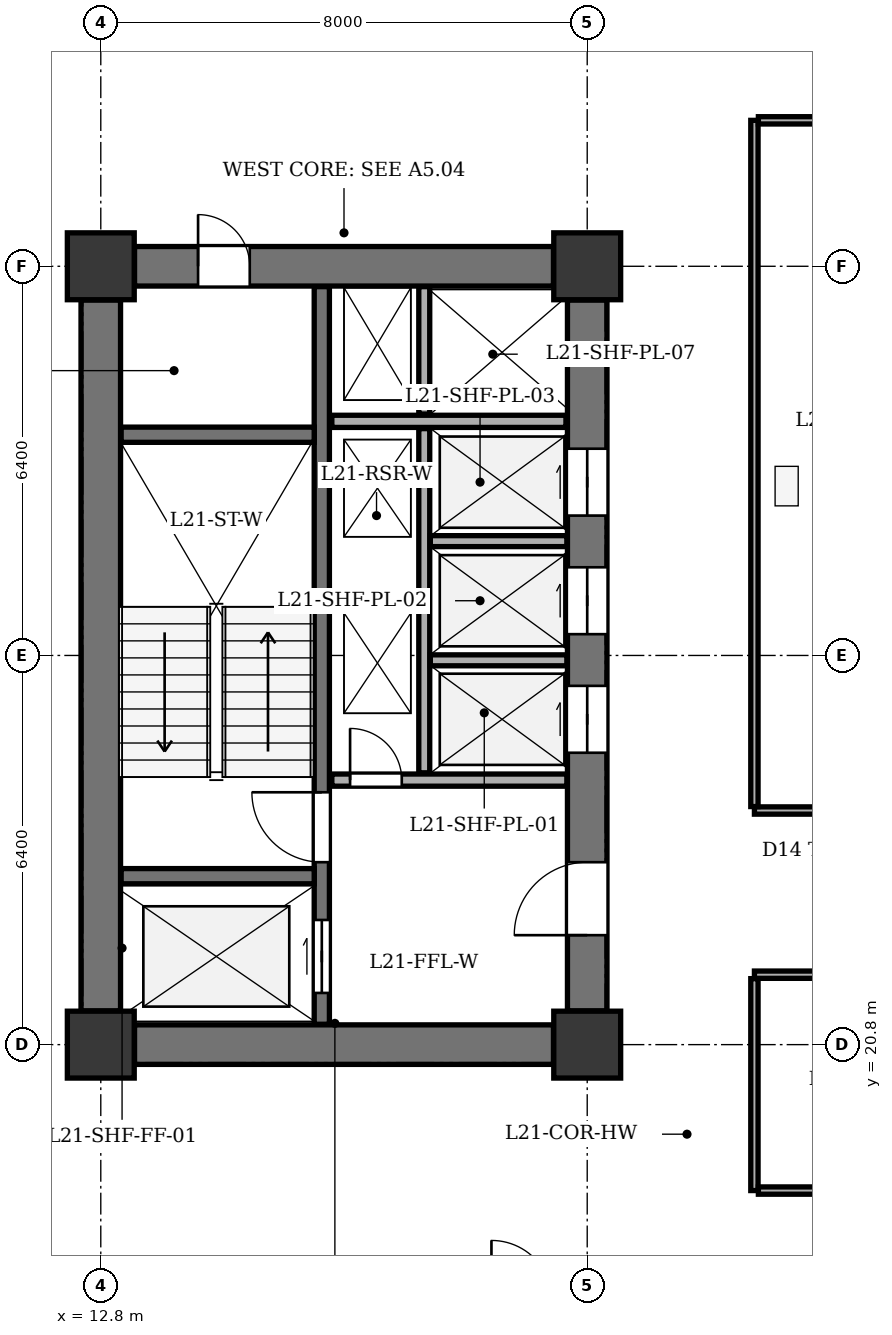
"""IFC4 building model, lengths in metres.
Left out: names, types, materials, properties, quantities, classifications, styles, units other than length and angle.
Written with IfcOpenShell. Run it as: python <this file> out.ifc"""

import sys

from ifc_helpers import new_model, si_unit, direction, frame, frame_2d, origin, origin_2d, place, context, subcontext, project, spatial, rectangle, extrude, element, fill, save


model = new_model("IFC4")
c1 = context("Model", 3, precision=1e-05, world=origin(), true_north=direction((0.0, 1.0)))
c2 = subcontext(c1, "Body", "Model", "MODEL_VIEW")
j1 = project(units=[si_unit("LENGTHUNIT", "METRE"), si_unit("PLANEANGLEUNIT", "RADIAN")], contexts=[c1])
p1 = place(None, origin())
s1 = spatial("IfcSite", under=j1, at=p1, CompositionType="ELEMENT")
p2 = place(p1, origin())
s2 = spatial("IfcBuilding", under=s1, at=p2, CompositionType="ELEMENT")
p3 = place(p2, frame((0.0, 0.0, 86.7)))
s3 = spatial("IfcBuildingStorey", under=s2, at=p3, CompositionType="ELEMENT", Elevation=86.7)
for number, where, z_axis, x_axis in (
    (1, (12.8, 20.8, 0.0), (0.0, 0.0, 1.0), (1.0, 0.0, 0.0)),
    (2, (20.8, 20.8, 0.0), (0.0, 0.0, 1.0), (1.0, 0.0, 0.0)),
    (3, (12.8, 33.6, 0.0), (0.0, 0.0, 1.0), (1.0, 0.0, 0.0)),
    (4, (20.8, 33.6, 0.0), (0.0, 0.0, 1.0), (1.0, 0.0, 0.0)),
):
    element("IfcColumn", number, at=place(p3, frame(where, z_axis=z_axis, x_axis=x_axis)), inside=s3, PredefinedType="COLUMN", context=c2, shape_type="SweptSolid", body=[
        extrude(rectangle(XDim=1.1, YDim=1.1, at=origin_2d()), origin(), (0.0, 0.0, 1.0), 3.9),
    ])
p4 = place(p3, frame((12.8, 21.355, 0.0), z_axis=(0.0, 0.0, 1.0), x_axis=(0.0, 1.0, 0.0)))
e5 = element("IfcWall", 5, at=p4, inside=s3, PredefinedType="SHEAR", context=c2, shape_type="SweptSolid", body=[
    extrude(rectangle(XDim=11.69, YDim=0.65, at=frame_2d((5.845, 0.0))), origin(), (0.0, 0.0, 1.0), 3.6),
])
p5 = place(p3, frame((13.355, 20.8, 0.0), z_axis=(0.0, 0.0, 1.0), x_axis=(1.0, 0.0, 0.0)))
e6 = element("IfcWall", 6, at=p5, inside=s3, PredefinedType="SHEAR", context=c2, shape_type="SweptSolid", body=[
    extrude(rectangle(XDim=6.89, YDim=0.65, at=frame_2d((3.445, 0.0))), origin(), (0.0, 0.0, 1.0), 3.6),
])
p6 = place(p3, frame((13.355, 33.6, 0.0), z_axis=(0.0, 0.0, 1.0), x_axis=(1.0, 0.0, 0.0)))
e7 = element("IfcWall", 7, at=p6, inside=s3, PredefinedType="SHEAR", context=c2, shape_type="SweptSolid", body=[
    extrude(rectangle(XDim=6.89, YDim=0.65, at=frame_2d((3.445, 0.0))), origin(), (0.0, 0.0, 1.0), 3.6),
])
p7 = place(p6, frame((1.045, 0.0, 0.0)))
e8 = element("IfcOpeningElement", 8, at=p7, cuts=e7, PredefinedType="OPENING", context=c2, shape_type="SweptSolid", body=[
    extrude(rectangle(XDim=0.85, YDim=2.02, at=frame_2d((0.425, 1.01))), frame((0.0, 0.335, 0.0), z_axis=(0.0, -1.0, 0.0), x_axis=(1.0, 0.0, 0.0)), (0.0, 0.0, 1.0), 0.67),
])
p8 = place(p3, frame((20.8, 21.355, 0.0), z_axis=(0.0, 0.0, 1.0), x_axis=(0.0, 1.0, 0.0)))
e9 = element("IfcWall", 9, at=p8, inside=s3, PredefinedType="SHEAR", context=c2, shape_type="SweptSolid", body=[
    extrude(rectangle(XDim=11.69, YDim=0.65, at=frame_2d((5.845, 0.0))), origin(), (0.0, 0.0, 1.0), 3.6),
])
p9 = place(p8, frame((1.245, 0.0, 0.0)))
e10 = element("IfcOpeningElement", 10, at=p9, cuts=e9, PredefinedType="OPENING", context=c2, shape_type="SweptSolid", body=[
    extrude(rectangle(XDim=1.2, YDim=2.15, at=frame_2d((0.6, 1.075))), frame((0.0, 0.335, 0.0), z_axis=(0.0, -1.0, 0.0), x_axis=(1.0, 0.0, 0.0)), (0.0, 0.0, 1.0), 0.67),
])
p10 = place(p8, frame((4.245, 0.0, 0.0)))
e11 = element("IfcOpeningElement", 11, at=p10, cuts=e9, PredefinedType="OPENING", context=c2, shape_type="SweptSolid", body=[
    extrude(rectangle(XDim=1.1, YDim=2.1, at=frame_2d((0.55, 1.05))), frame((0.0, 0.335, 0.0), z_axis=(0.0, -1.0, 0.0), x_axis=(1.0, 0.0, 0.0)), (0.0, 0.0, 1.0), 0.67),
])
p11 = place(p8, frame((6.195, 0.0, 0.0)))
e12 = element("IfcOpeningElement", 12, at=p11, cuts=e9, PredefinedType="OPENING", context=c2, shape_type="SweptSolid", body=[
    extrude(rectangle(XDim=1.1, YDim=2.1, at=frame_2d((0.55, 1.05))), frame((0.0, 0.335, 0.0), z_axis=(0.0, -1.0, 0.0), x_axis=(1.0, 0.0, 0.0)), (0.0, 0.0, 1.0), 0.67),
])
p12 = place(p8, frame((8.145, 0.0, 0.0)))
e13 = element("IfcOpeningElement", 13, at=p12, cuts=e9, PredefinedType="OPENING", context=c2, shape_type="SweptSolid", body=[
    extrude(rectangle(XDim=1.1, YDim=2.1, at=frame_2d((0.55, 1.05))), frame((0.0, 0.335, 0.0), z_axis=(0.0, -1.0, 0.0), x_axis=(1.0, 0.0, 0.0)), (0.0, 0.0, 1.0), 0.67),
])
p13 = place(p3, frame((16.435, 21.135, 0.0), z_axis=(0.0, 0.0, 1.0), x_axis=(0.0, 1.0, 0.0)))
e14 = element("IfcWall", 14, at=p13, inside=s3, PredefinedType="SHEAR", context=c2, shape_type="SweptSolid", body=[
    extrude(rectangle(XDim=12.13, YDim=0.25, at=frame_2d((6.065, 0.0))), origin(), (0.0, 0.0, 1.0), 3.6),
])
p14 = place(p13, frame((0.515, 0.0, 0.0)))
e15 = element("IfcOpeningElement", 15, at=p14, cuts=e14, PredefinedType="OPENING", context=c2, shape_type="SweptSolid", body=[
    extrude(rectangle(XDim=1.2, YDim=2.15, at=frame_2d((0.6, 1.075))), frame((0.0, 0.135, 0.0), z_axis=(0.0, -1.0, 0.0), x_axis=(1.0, 0.0, 0.0)), (0.0, 0.0, 1.0), 0.27),
])
p15 = place(p13, frame((2.665, 0.0, 0.0)))
e16 = element("IfcOpeningElement", 16, at=p15, cuts=e14, PredefinedType="OPENING", context=c2, shape_type="SweptSolid", body=[
    extrude(rectangle(XDim=1.15, YDim=2.15, at=frame_2d((0.575, 1.075))), frame((0.0, 0.135, 0.0), z_axis=(0.0, -1.0, 0.0), x_axis=(1.0, 0.0, 0.0)), (0.0, 0.0, 1.0), 0.27),
])
for number, where, z_axis, x_axis in (
    (17, (13.135, 23.57, 0.0), (0.0, 0.0, 1.0), (1.0, 0.0, 0.0)),
    (18, (13.135, 30.83, 0.0), (0.0, 0.0, 1.0), (1.0, 0.0, 0.0)),
):
    element("IfcWall", number, at=place(p3, frame(where, z_axis=z_axis, x_axis=x_axis)), inside=s3, PredefinedType="SHEAR", context=c2, shape_type="SweptSolid", body=[
        extrude(rectangle(XDim=3.175, YDim=0.25, at=frame_2d((1.587, 0.0))), origin(), (0.0, 0.0, 1.0), 3.6),
    ])
p16 = place(p3, frame((16.6, 25.15, 0.0), z_axis=(0.0, 0.0, 1.0), x_axis=(1.0, 0.0, 0.0)))
e19 = element("IfcWall", 19, at=p16, inside=s3, PredefinedType="SOLIDWALL", context=c2, shape_type="SweptSolid", body=[
    extrude(rectangle(XDim=3.865, YDim=0.2, at=frame_2d((1.933, 0.0))), origin(), (0.0, 0.0, 1.0), 3.6),
])
p17 = place(p16, frame((0.3, 0.0, 0.0)))
e20 = element("IfcOpeningElement", 20, at=p17, cuts=e19, PredefinedType="OPENING", context=c2, shape_type="SweptSolid", body=[
    extrude(rectangle(XDim=0.85, YDim=2.02, at=frame_2d((0.425, 1.01))), frame((0.0, 0.11, 0.0), z_axis=(0.0, -1.0, 0.0), x_axis=(1.0, 0.0, 0.0)), (0.0, 0.0, 1.0), 0.22),
])
p18 = place(p3, frame((16.6, 31.05, 0.0), z_axis=(0.0, 0.0, 1.0), x_axis=(1.0, 0.0, 0.0)))
e21 = element("IfcWall", 21, at=p18, inside=s3, PredefinedType="SOLIDWALL", context=c2, shape_type="SweptSolid", body=[
    extrude(rectangle(XDim=3.85, YDim=0.2, at=frame_2d((1.925, 0.0))), origin(), (0.0, 0.0, 1.0), 3.6),
])
p19 = place(p3, frame((18.12, 25.27, 0.0), z_axis=(0.0, 0.0, 1.0), x_axis=(0.0, 1.0, 0.0)))
e22 = element("IfcWall", 22, at=p19, inside=s3, PredefinedType="PARTITIONING", context=c2, shape_type="SweptSolid", body=[
    extrude(rectangle(XDim=5.66, YDim=0.18, at=frame_2d((2.83, 0.0))), origin(), (0.0, 0.0, 1.0), 3.6),
])
p20 = place(p3, frame((18.12, 31.17, 0.0), z_axis=(0.0, 0.0, 1.0), x_axis=(0.0, 1.0, 0.0)))
e23 = element("IfcWall", 23, at=p20, inside=s3, PredefinedType="PARTITIONING", context=c2, shape_type="SweptSolid", body=[
    extrude(rectangle(XDim=2.095, YDim=0.18, at=frame_2d((1.047, 0.0))), origin(), (0.0, 0.0, 1.0), 3.6),
])
for number, where, z_axis, x_axis in (
    (24, (18.22, 27.12, 0.0), (0.0, 0.0, 1.0), (1.0, 0.0, 0.0)),
    (25, (18.22, 29.08, 0.0), (0.0, 0.0, 1.0), (1.0, 0.0, 0.0)),
):
    element("IfcWall", number, at=place(p3, frame(where, z_axis=z_axis, x_axis=x_axis)), inside=s3, PredefinedType="PARTITIONING", context=c2, shape_type="SweptSolid", body=[
        extrude(rectangle(XDim=2.245, YDim=0.18, at=frame_2d((1.123, 0.0))), origin(), (0.0, 0.0, 1.0), 3.6),
    ])
p21 = place(p3, frame((23.55, 24.65, 0.0), z_axis=(0.0, 0.0, 1.0), x_axis=(1.0, 0.0, 0.0)))
e26 = element("IfcWall", 26, at=p21, inside=s3, PredefinedType="PARTITIONING", context=c2, shape_type="SweptSolid", body=[
    extrude(rectangle(XDim=8.9, YDim=0.12, at=frame_2d((4.45, 0.0))), origin(), (0.0, 0.0, 1.0), 3.135),
])
p22 = place(p21, frame((1.0, 0.0, 0.0)))
e27 = element("IfcOpeningElement", 27, at=p22, cuts=e26, PredefinedType="OPENING", context=c2, shape_type="SweptSolid", body=[
    extrude(rectangle(XDim=0.95, YDim=2.1, at=frame_2d((0.475, 1.05))), frame((0.0, 0.07, 0.0), z_axis=(0.0, -1.0, 0.0), x_axis=(1.0, 0.0, 0.0)), (0.0, 0.0, 1.0), 0.14),
])
p23 = place(p21, frame((4.1, 0.0, 0.0)))
e28 = element("IfcOpeningElement", 28, at=p23, cuts=e26, PredefinedType="OPENING", context=c2, shape_type="SweptSolid", body=[
    extrude(rectangle(XDim=0.95, YDim=2.1, at=frame_2d((0.475, 1.05))), frame((0.0, 0.07, 0.0), z_axis=(0.0, -1.0, 0.0), x_axis=(1.0, 0.0, 0.0)), (0.0, 0.0, 1.0), 0.14),
])
p24 = place(p21, frame((7.0, 0.0, 0.0)))
e29 = element("IfcOpeningElement", 29, at=p24, cuts=e26, PredefinedType="OPENING", context=c2, shape_type="SweptSolid", body=[
    extrude(rectangle(XDim=1.0, YDim=2.1, at=frame_2d((0.5, 1.05))), frame((0.0, 0.07, 0.0), z_axis=(0.0, -1.0, 0.0), x_axis=(1.0, 0.0, 0.0)), (0.0, 0.0, 1.0), 0.14),
])
p25 = place(p3, frame((23.55, 24.715, 0.0), z_axis=(0.0, 0.0, 1.0), x_axis=(0.0, 1.0, 0.0)))
e30 = element("IfcWall", 30, at=p25, inside=s3, PredefinedType="PARTITIONING", context=c2, shape_type="SweptSolid", body=[
    extrude(rectangle(XDim=11.285, YDim=0.12, at=frame_2d((5.643, 0.0))), origin(), (0.0, 0.0, 1.0), 3.6),
])
p26 = place(p3, frame((23.615, 36.0, 0.0), z_axis=(0.0, 0.0, 1.0), x_axis=(1.0, 0.0, 0.0)))
e31 = element("IfcWall", 31, at=p26, inside=s3, PredefinedType="PARTITIONING", context=c2, shape_type="SweptSolid", body=[
    extrude(rectangle(XDim=8.77, YDim=0.12, at=frame_2d((4.385, 0.0))), origin(), (0.0, 0.0, 1.0), 3.6),
])
p27 = place(p3, frame((23.55, 21.95, 0.0), z_axis=(0.0, 0.0, 1.0), x_axis=(1.0, 0.0, 0.0)))
e32 = element("IfcWall", 32, at=p27, inside=s3, PredefinedType="PARTITIONING", context=c2, shape_type="SweptSolid", body=[
    extrude(rectangle(XDim=8.9, YDim=0.12, at=frame_2d((4.45, 0.0))), origin(), (0.0, 0.0, 1.0), 3.135),
])
p28 = place(p27, frame((3.6, 0.0, 0.0)))
e33 = element("IfcOpeningElement", 33, at=p28, cuts=e32, PredefinedType="OPENING", context=c2, shape_type="SweptSolid", body=[
    extrude(rectangle(XDim=1.1, YDim=2.15, at=frame_2d((0.55, 1.075))), frame((0.0, 0.07, 0.0), z_axis=(0.0, -1.0, 0.0), x_axis=(1.0, 0.0, 0.0)), (0.0, 0.0, 1.0), 0.14),
])
p29 = place(p3, frame((23.55, 18.4, 0.0), z_axis=(0.0, 0.0, 1.0), x_axis=(0.0, 1.0, 0.0)))
e34 = element("IfcWall", 34, at=p29, inside=s3, PredefinedType="PARTITIONING", context=c2, shape_type="SweptSolid", body=[
    extrude(rectangle(XDim=3.485, YDim=0.12, at=frame_2d((1.743, 0.0))), origin(), (0.0, 0.0, 1.0), 3.6),
])
p30 = place(p3, frame((23.615, 18.4, 0.0), z_axis=(0.0, 0.0, 1.0), x_axis=(1.0, 0.0, 0.0)))
e35 = element("IfcWall", 35, at=p30, inside=s3, PredefinedType="PARTITIONING", context=c2, shape_type="SweptSolid", body=[
    extrude(rectangle(XDim=8.77, YDim=0.12, at=frame_2d((4.385, 0.0))), origin(), (0.0, 0.0, 1.0), 3.6),
])
p31 = place(p7, origin())
e36 = element("IfcDoor", 36, at=p31, inside=s3, OperationType="SINGLE_SWING_LEFT", PredefinedType="DOOR", context=c2, shape_type="SweptSolid", body=[
    extrude(rectangle(XDim=0.85, YDim=2.02, at=frame_2d((0.425, 1.01))), frame((0.0, 0.025, 0.0), z_axis=(0.0, -1.0, 0.0), x_axis=(1.0, 0.0, 0.0)), (0.0, 0.0, 1.0), 0.05),
])
fill(e8, e36)
p32 = place(p9, origin())
e37 = element("IfcDoor", 37, at=p32, inside=s3, OperationType="SINGLE_SWING_LEFT", PredefinedType="DOOR", context=c2, shape_type="SweptSolid", body=[
    extrude(rectangle(XDim=1.2, YDim=2.15, at=frame_2d((0.6, 1.075))), frame((0.0, 0.025, 0.0), z_axis=(0.0, -1.0, 0.0), x_axis=(1.0, 0.0, 0.0)), (0.0, 0.0, 1.0), 0.05),
])
fill(e10, e37)
p33 = place(p10, origin())
e38 = element("IfcDoor", 38, at=p33, inside=s3, OperationType="DOUBLE_DOOR_SLIDING", PredefinedType="DOOR", context=c2, shape_type="SweptSolid", body=[
    extrude(rectangle(XDim=1.1, YDim=2.1, at=frame_2d((0.55, 1.05))), frame((0.0, 0.025, 0.0), z_axis=(0.0, -1.0, 0.0), x_axis=(1.0, 0.0, 0.0)), (0.0, 0.0, 1.0), 0.05),
])
fill(e11, e38)
p34 = place(p11, origin())
e39 = element("IfcDoor", 39, at=p34, inside=s3, OperationType="DOUBLE_DOOR_SLIDING", PredefinedType="DOOR", context=c2, shape_type="SweptSolid", body=[
    extrude(rectangle(XDim=1.1, YDim=2.1, at=frame_2d((0.55, 1.05))), frame((0.0, 0.025, 0.0), z_axis=(0.0, -1.0, 0.0), x_axis=(1.0, 0.0, 0.0)), (0.0, 0.0, 1.0), 0.05),
])
fill(e12, e39)
p35 = place(p12, origin())
e40 = element("IfcDoor", 40, at=p35, inside=s3, OperationType="DOUBLE_DOOR_SLIDING", PredefinedType="DOOR", context=c2, shape_type="SweptSolid", body=[
    extrude(rectangle(XDim=1.1, YDim=2.1, at=frame_2d((0.55, 1.05))), frame((0.0, 0.025, 0.0), z_axis=(0.0, -1.0, 0.0), x_axis=(1.0, 0.0, 0.0)), (0.0, 0.0, 1.0), 0.05),
])
fill(e13, e40)
p36 = place(p14, origin())
e41 = element("IfcDoor", 41, at=p36, inside=s3, OperationType="DOUBLE_DOOR_SLIDING", PredefinedType="DOOR", context=c2, shape_type="SweptSolid", body=[
    extrude(rectangle(XDim=1.2, YDim=2.15, at=frame_2d((0.6, 1.075))), frame((0.0, 0.025, 0.0), z_axis=(0.0, -1.0, 0.0), x_axis=(1.0, 0.0, 0.0)), (0.0, 0.0, 1.0), 0.05),
])
fill(e15, e41)
p37 = place(p15, origin())
e42 = element("IfcDoor", 42, at=p37, inside=s3, OperationType="SINGLE_SWING_RIGHT", PredefinedType="DOOR", context=c2, shape_type="SweptSolid", body=[
    extrude(rectangle(XDim=1.15, YDim=2.15, at=frame_2d((0.575, 1.075))), frame((0.0, 0.025, 0.0), z_axis=(0.0, -1.0, 0.0), x_axis=(1.0, 0.0, 0.0)), (0.0, 0.0, 1.0), 0.05),
])
fill(e16, e42)
p38 = place(p17, origin())
e43 = element("IfcDoor", 43, at=p38, inside=s3, OperationType="SINGLE_SWING_LEFT", PredefinedType="DOOR", context=c2, shape_type="SweptSolid", body=[
    extrude(rectangle(XDim=0.85, YDim=2.02, at=frame_2d((0.425, 1.01))), frame((0.0, 0.025, 0.0), z_axis=(0.0, -1.0, 0.0), x_axis=(1.0, 0.0, 0.0)), (0.0, 0.0, 1.0), 0.05),
])
fill(e20, e43)
save(model, sys.argv[1])
